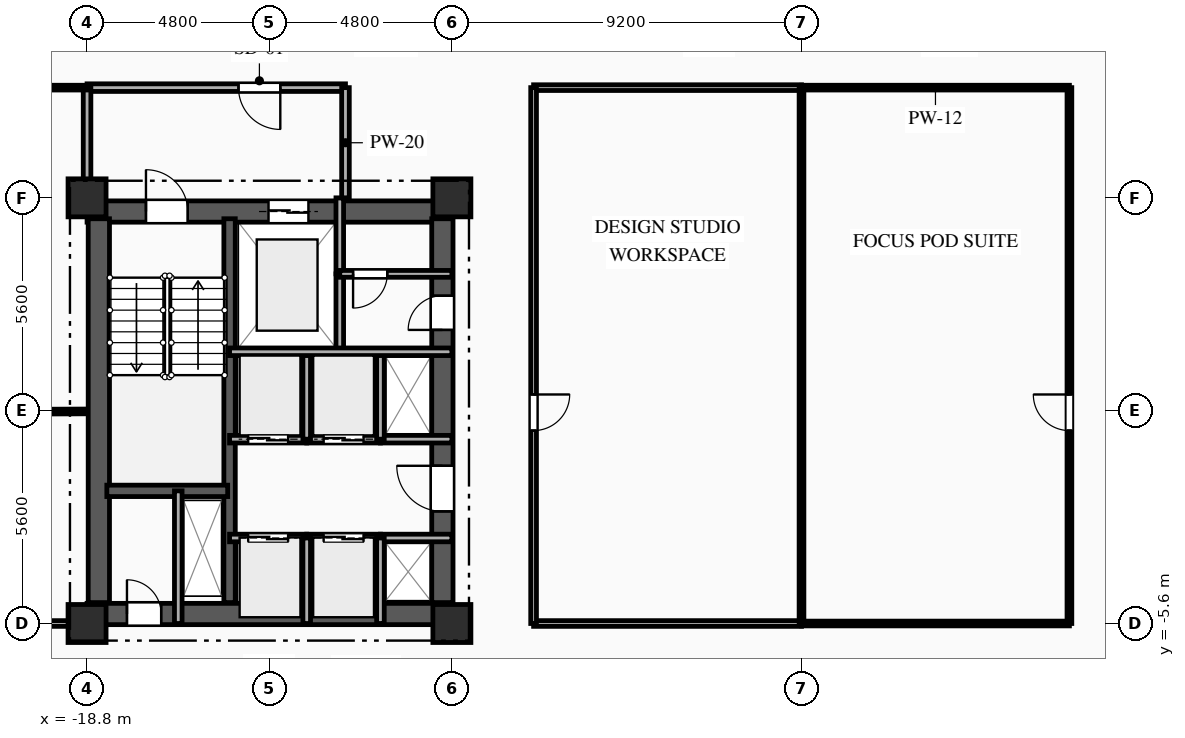
"""IFC4 building model, lengths in metres.
Left out: names, types, materials, properties, quantities, classifications, styles, units other than length and angle.
Written with IfcOpenShell. Run it as: python <this file> out.ifc"""

import sys

from ifc_helpers import new_model, si_unit, direction, frame, frame_2d, origin, origin_2d, place, context, subcontext, project, spatial, rectangle, extrude, element, fill, save


model = new_model("IFC4")
c1 = context("Model", 3, precision=1e-05, world=origin(), true_north=direction((0.0, 1.0)))
c2 = subcontext(c1, "Body", "Model", "MODEL_VIEW")
j1 = project(units=[si_unit("LENGTHUNIT", "METRE"), si_unit("PLANEANGLEUNIT", "RADIAN")], contexts=[c1])
p1 = place(None, origin())
s1 = spatial("IfcSite", under=j1, at=p1, CompositionType="ELEMENT")
p2 = place(p1, origin())
s2 = spatial("IfcBuilding", under=s1, at=p2, CompositionType="ELEMENT")
p3 = place(p2, frame((0.0, 0.0, 105.8)))
s3 = spatial("IfcBuildingStorey", under=s2, at=p3, CompositionType="ELEMENT", Elevation=105.8)
for number, where, z_axis, x_axis in (
    (1, (-18.8, -5.6, 0.0), (0.0, 0.0, 1.0), (1.0, 0.0, 0.0)),
    (2, (-18.8, 5.6, 0.0), (0.0, 0.0, 1.0), (1.0, 0.0, 0.0)),
    (3, (-9.2, -5.6, 0.0), (0.0, 0.0, 1.0), (1.0, 0.0, 0.0)),
    (4, (-9.2, 5.6, 0.0), (0.0, 0.0, 1.0), (1.0, 0.0, 0.0)),
):
    element("IfcColumn", number, at=place(p3, frame(where, z_axis=z_axis, x_axis=x_axis)), inside=s3, PredefinedType="COLUMN", context=c2, shape_type="SweptSolid", body=[
        extrude(rectangle(XDim=1.0, YDim=1.0, at=origin_2d()), origin(), (0.0, 0.0, 1.0), 3.35),
    ])
p4 = place(p3, frame((-18.8, 5.24, 0.0), z_axis=(0.0, 0.0, 1.0), x_axis=(1.0, 0.0, 0.0)))
e5 = element("IfcWall", 5, at=p4, inside=s3, PredefinedType="SHEAR", context=c2, shape_type="SweptSolid", body=[
    extrude(rectangle(XDim=9.6, YDim=0.56, at=frame_2d((4.8, 0.0))), origin(), (0.0, 0.0, 1.0), 3.045),
])
p5 = place(p4, frame((1.55, 0.0, 0.0)))
e6 = element("IfcOpeningElement", 6, at=p5, cuts=e5, PredefinedType="OPENING", context=c2, shape_type="SweptSolid", body=[
    extrude(rectangle(XDim=1.1, YDim=2.15, at=frame_2d((0.55, 1.075))), frame((0.0, 0.29, 0.0), z_axis=(0.0, -1.0, 0.0), x_axis=(1.0, 0.0, 0.0)), (0.0, 0.0, 1.0), 0.58),
])
p6 = place(p4, frame((4.775, 0.0, 0.0)))
e7 = element("IfcOpeningElement", 7, at=p6, cuts=e5, PredefinedType="OPENING", context=c2, shape_type="SweptSolid", body=[
    extrude(rectangle(XDim=1.05, YDim=2.1, at=frame_2d((0.525, 1.05))), frame((0.0, 0.29, 0.0), z_axis=(0.0, -1.0, 0.0), x_axis=(1.0, 0.0, 0.0)), (0.0, 0.0, 1.0), 0.58),
])
p7 = place(p3, frame((-18.8, -5.35, 0.0), z_axis=(0.0, 0.0, 1.0), x_axis=(1.0, 0.0, 0.0)))
e8 = element("IfcWall", 8, at=p7, inside=s3, PredefinedType="SHEAR", context=c2, shape_type="SweptSolid", body=[
    extrude(rectangle(XDim=9.6, YDim=0.56, at=frame_2d((4.8, 0.0))), origin(), (0.0, 0.0, 1.0), 3.045),
])
p8 = place(p7, frame((1.05, 0.0, 0.0)))
e9 = element("IfcOpeningElement", 9, at=p8, cuts=e8, PredefinedType="OPENING", context=c2, shape_type="SweptSolid", body=[
    extrude(rectangle(XDim=0.9, YDim=2.1, at=frame_2d((0.45, 1.05))), frame((0.0, 0.29, 0.0), z_axis=(0.0, -1.0, 0.0), x_axis=(1.0, 0.0, 0.0)), (0.0, 0.0, 1.0), 0.58),
])
p9 = place(p3, frame((-18.49, -5.05, 0.0), z_axis=(0.0, 0.0, 1.0), x_axis=(0.0, 1.0, 0.0)))
e10 = element("IfcWall", 10, at=p9, inside=s3, PredefinedType="SHEAR", context=c2, shape_type="SweptSolid", body=[
    extrude(rectangle(XDim=10.1, YDim=0.56, at=frame_2d((5.05, 0.0))), origin(), (0.0, 0.0, 1.0), 3.045),
])
p10 = place(p3, frame((-9.45, -5.05, 0.0), z_axis=(0.0, 0.0, 1.0), x_axis=(0.0, 1.0, 0.0)))
e11 = element("IfcWall", 11, at=p10, inside=s3, PredefinedType="SHEAR", context=c2, shape_type="SweptSolid", body=[
    extrude(rectangle(XDim=10.1, YDim=0.56, at=frame_2d((5.05, 0.0))), origin(), (0.0, 0.0, 1.0), 3.045),
])
p11 = place(p10, frame((7.175, 0.0, 0.0)))
e12 = element("IfcOpeningElement", 12, at=p11, cuts=e11, PredefinedType="OPENING", context=c2, shape_type="SweptSolid", body=[
    extrude(rectangle(XDim=0.9, YDim=2.1, at=frame_2d((0.45, 1.05))), frame((0.0, 0.29, 0.0), z_axis=(0.0, -1.0, 0.0), x_axis=(1.0, 0.0, 0.0)), (0.0, 0.0, 1.0), 0.58),
])
p12 = place(p10, frame((2.4, 0.0, 0.0)))
e13 = element("IfcOpeningElement", 13, at=p12, cuts=e11, PredefinedType="OPENING", context=c2, shape_type="SweptSolid", body=[
    extrude(rectangle(XDim=1.2, YDim=2.15, at=frame_2d((0.6, 1.075))), frame((0.0, 0.29, 0.0), z_axis=(0.0, -1.0, 0.0), x_axis=(1.0, 0.0, 0.0)), (0.0, 0.0, 1.0), 0.58),
])
p13 = place(p3, frame((-15.05, -5.05, 0.0), z_axis=(0.0, 0.0, 1.0), x_axis=(0.0, 1.0, 0.0)))
e14 = element("IfcWall", 14, at=p13, inside=s3, PredefinedType="SHEAR", context=c2, shape_type="SweptSolid", body=[
    extrude(rectangle(XDim=10.1, YDim=0.3, at=frame_2d((5.05, 0.0))), origin(), (0.0, 0.0, 1.0), 3.045),
])
p14 = place(p3, frame((-18.28, -2.11, 0.0), z_axis=(0.0, 0.0, 1.0), x_axis=(1.0, 0.0, 0.0)))
e15 = element("IfcWall", 15, at=p14, inside=s3, PredefinedType="SHEAR", context=c2, shape_type="SweptSolid", body=[
    extrude(rectangle(XDim=3.18, YDim=0.3, at=frame_2d((1.59, 0.0))), origin(), (0.0, 0.0, 1.0), 3.045),
])
p15 = place(p3, frame((-16.4, -5.6, 0.0), z_axis=(0.0, 0.0, 1.0), x_axis=(0.0, 1.0, 0.0)))
e16 = element("IfcWall", 16, at=p15, inside=s3, PredefinedType="PARTITIONING", context=c2, shape_type="SweptSolid", body=[
    extrude(rectangle(XDim=3.49, YDim=0.2, at=frame_2d((1.745, 0.0))), origin(), (0.0, 0.0, 1.0), 3.045),
])
p16 = place(p3, frame((-12.15, 1.55, 0.0), z_axis=(0.0, 0.0, 1.0), x_axis=(0.0, 1.0, 0.0)))
e17 = element("IfcWall", 17, at=p16, inside=s3, PredefinedType="PARTITIONING", context=c2, shape_type="SweptSolid", body=[
    extrude(rectangle(XDim=2.05, YDim=0.2, at=frame_2d((1.025, 0.0))), origin(), (0.0, 0.0, 1.0), 3.045),
])
p17 = place(p3, frame((-12.15, 3.6, 0.0), z_axis=(0.0, 0.0, 1.0), x_axis=(0.0, 1.0, 0.0)))
e18 = element("IfcWall", 18, at=p17, inside=s3, PredefinedType="PARTITIONING", context=c2, shape_type="SweptSolid", body=[
    extrude(rectangle(XDim=2.0, YDim=0.2, at=frame_2d((1.0, 0.0))), origin(), (0.0, 0.0, 1.0), 3.045),
])
p18 = place(p3, frame((-12.0, 8.5, 0.0), z_axis=(0.0, 0.0, 1.0), x_axis=(-1.0, 0.0, 0.0)))
e19 = element("IfcWall", 19, at=p18, inside=s3, PredefinedType="PARTITIONING", context=c2, shape_type="SweptSolid", body=[
    extrude(rectangle(XDim=6.8, YDim=0.2, at=frame_2d((3.4, 0.0))), origin(), (0.0, 0.0, 1.0), 3.045),
])
p19 = place(p18, frame((1.715, 0.0, 0.0)))
e20 = element("IfcOpeningElement", 20, at=p19, cuts=e19, PredefinedType="OPENING", context=c2, shape_type="SweptSolid", body=[
    extrude(rectangle(XDim=1.1, YDim=2.15, at=frame_2d((0.55, 1.075))), frame((0.0, 0.11, 0.0), z_axis=(0.0, -1.0, 0.0), x_axis=(1.0, 0.0, 0.0)), (0.0, 0.0, 1.0), 0.22),
])
p20 = place(p3, frame((-12.0, 5.6, 0.0), z_axis=(0.0, 0.0, 1.0), x_axis=(0.0, 1.0, 0.0)))
e21 = element("IfcWall", 21, at=p20, inside=s3, PredefinedType="PARTITIONING", context=c2, shape_type="SweptSolid", body=[
    extrude(rectangle(XDim=2.9, YDim=0.2, at=frame_2d((1.45, 0.0))), origin(), (0.0, 0.0, 1.0), 3.045),
])
p21 = place(p3, frame((-18.8, 8.5, 0.0), z_axis=(0.0, 0.0, 1.0), x_axis=(0.0, -1.0, 0.0)))
e22 = element("IfcWall", 22, at=p21, inside=s3, PredefinedType="PARTITIONING", context=c2, shape_type="SweptSolid", body=[
    extrude(rectangle(XDim=2.9, YDim=0.2, at=frame_2d((1.45, 0.0))), origin(), (0.0, 0.0, 1.0), 2.53),
])
p22 = place(p3, frame((-9.2, 3.6, 0.0), z_axis=(0.0, 0.0, 1.0), x_axis=(-1.0, 0.0, 0.0)))
e23 = element("IfcWall", 23, at=p22, inside=s3, PredefinedType="PARTITIONING", context=c2, shape_type="SweptSolid", body=[
    extrude(rectangle(XDim=2.95, YDim=0.18, at=frame_2d((1.475, 0.0))), origin(), (0.0, 0.0, 1.0), 3.045),
])
p23 = place(p22, frame((1.7, 0.0, 0.0)))
e24 = element("IfcOpeningElement", 24, at=p23, cuts=e23, PredefinedType="OPENING", context=c2, shape_type="SweptSolid", body=[
    extrude(rectangle(XDim=0.9, YDim=2.1, at=frame_2d((0.45, 1.05))), frame((0.0, 0.1, 0.0), z_axis=(0.0, -1.0, 0.0), x_axis=(1.0, 0.0, 0.0)), (0.0, 0.0, 1.0), 0.2),
])
p24 = place(p3, frame((-15.05, -3.35, 0.0), z_axis=(0.0, 0.0, 1.0), x_axis=(1.0, 0.0, 0.0)))
e25 = element("IfcWall", 25, at=p24, inside=s3, PredefinedType="PARTITIONING", context=c2, shape_type="SweptSolid", body=[
    extrude(rectangle(XDim=2.03, YDim=0.2, at=frame_2d((1.015, 0.0))), origin(), (0.0, 0.0, 1.0), 3.045),
])
p25 = place(p24, frame((0.49, 0.0, 0.0)))
e26 = element("IfcOpeningElement", 26, at=p25, cuts=e25, PredefinedType="OPENING", context=c2, shape_type="SweptSolid", body=[
    extrude(rectangle(XDim=1.05, YDim=2.1, at=frame_2d((0.525, 1.05))), frame((0.0, 0.11, 0.0), z_axis=(0.0, -1.0, 0.0), x_axis=(1.0, 0.0, 0.0)), (0.0, 0.0, 1.0), 0.22),
])
p26 = place(p3, frame((-13.02, -3.35, 0.0), z_axis=(0.0, 0.0, 1.0), x_axis=(1.0, 0.0, 0.0)))
e27 = element("IfcWall", 27, at=p26, inside=s3, PredefinedType="PARTITIONING", context=c2, shape_type="SweptSolid", body=[
    extrude(rectangle(XDim=1.94, YDim=0.2, at=frame_2d((0.97, 0.0))), origin(), (0.0, 0.0, 1.0), 3.045),
])
p27 = place(p26, frame((0.445, 0.0, 0.0)))
e28 = element("IfcOpeningElement", 28, at=p27, cuts=e27, PredefinedType="OPENING", context=c2, shape_type="SweptSolid", body=[
    extrude(rectangle(XDim=1.05, YDim=2.1, at=frame_2d((0.525, 1.05))), frame((0.0, 0.11, 0.0), z_axis=(0.0, -1.0, 0.0), x_axis=(1.0, 0.0, 0.0)), (0.0, 0.0, 1.0), 0.22),
])
p28 = place(p3, frame((-11.08, -3.35, 0.0), z_axis=(0.0, 0.0, 1.0), x_axis=(1.0, 0.0, 0.0)))
e29 = element("IfcWall", 29, at=p28, inside=s3, PredefinedType="PARTITIONING", context=c2, shape_type="SweptSolid", body=[
    extrude(rectangle(XDim=1.88, YDim=0.2, at=frame_2d((0.94, 0.0))), origin(), (0.0, 0.0, 1.0), 2.76),
])
p29 = place(p3, frame((-13.02, -0.75, 0.0), z_axis=(0.0, 0.0, 1.0), x_axis=(-1.0, 0.0, 0.0)))
e30 = element("IfcWall", 30, at=p29, inside=s3, PredefinedType="PARTITIONING", context=c2, shape_type="SweptSolid", body=[
    extrude(rectangle(XDim=2.03, YDim=0.2, at=frame_2d((1.015, 0.0))), origin(), (0.0, 0.0, 1.0), 3.045),
])
p30 = place(p29, frame((0.49, 0.0, 0.0)))
e31 = element("IfcOpeningElement", 31, at=p30, cuts=e30, PredefinedType="OPENING", context=c2, shape_type="SweptSolid", body=[
    extrude(rectangle(XDim=1.05, YDim=2.1, at=frame_2d((0.525, 1.05))), frame((0.0, 0.11, 0.0), z_axis=(0.0, -1.0, 0.0), x_axis=(1.0, 0.0, 0.0)), (0.0, 0.0, 1.0), 0.22),
])
p31 = place(p3, frame((-11.08, -0.75, 0.0), z_axis=(0.0, 0.0, 1.0), x_axis=(-1.0, 0.0, 0.0)))
e32 = element("IfcWall", 32, at=p31, inside=s3, PredefinedType="PARTITIONING", context=c2, shape_type="SweptSolid", body=[
    extrude(rectangle(XDim=1.94, YDim=0.2, at=frame_2d((0.97, 0.0))), origin(), (0.0, 0.0, 1.0), 3.045),
])
p32 = place(p31, frame((0.445, 0.0, 0.0)))
e33 = element("IfcOpeningElement", 33, at=p32, cuts=e32, PredefinedType="OPENING", context=c2, shape_type="SweptSolid", body=[
    extrude(rectangle(XDim=1.05, YDim=2.1, at=frame_2d((0.525, 1.05))), frame((0.0, 0.11, 0.0), z_axis=(0.0, -1.0, 0.0), x_axis=(1.0, 0.0, 0.0)), (0.0, 0.0, 1.0), 0.22),
])
p33 = place(p3, frame((-9.2, -0.75, 0.0), z_axis=(0.0, 0.0, 1.0), x_axis=(-1.0, 0.0, 0.0)))
e34 = element("IfcWall", 34, at=p33, inside=s3, PredefinedType="PARTITIONING", context=c2, shape_type="SweptSolid", body=[
    extrude(rectangle(XDim=1.88, YDim=0.2, at=frame_2d((0.94, 0.0))), origin(), (0.0, 0.0, 1.0), 3.045),
])
for number, where, z_axis, x_axis in (
    (35, (-13.02, -5.6, 0.0), (0.0, 0.0, 1.0), (0.0, 1.0, 0.0)),
    (36, (-11.08, -5.6, 0.0), (0.0, 0.0, 1.0), (0.0, 1.0, 0.0)),
):
    element("IfcWall", number, at=place(p3, frame(where, z_axis=z_axis, x_axis=x_axis)), inside=s3, PredefinedType="PARTITIONING", context=c2, shape_type="SweptSolid", body=[
        extrude(rectangle(XDim=2.25, YDim=0.2, at=frame_2d((1.125, 0.0))), origin(), (0.0, 0.0, 1.0), 3.045),
    ])
for number, where, z_axis, x_axis in (
    (37, (-13.02, -0.75, 0.0), (0.0, 0.0, 1.0), (0.0, 1.0, 0.0)),
    (38, (-11.08, -0.75, 0.0), (0.0, 0.0, 1.0), (0.0, 1.0, 0.0)),
):
    element("IfcWall", number, at=place(p3, frame(where, z_axis=z_axis, x_axis=x_axis)), inside=s3, PredefinedType="PARTITIONING", context=c2, shape_type="SweptSolid", body=[
        extrude(rectangle(XDim=2.3, YDim=0.2, at=frame_2d((1.15, 0.0))), origin(), (0.0, 0.0, 1.0), 3.045),
    ])
p34 = place(p3, frame((-18.8, 8.5, 0.0), z_axis=(0.0, 0.0, 1.0), x_axis=(-1.0, 0.0, 0.0)))
e39 = element("IfcWall", 39, at=p34, inside=s3, PredefinedType="PARTITIONING", context=c2, shape_type="SweptSolid", body=[
    extrude(rectangle(XDim=4.2, YDim=0.125, at=frame_2d((2.1, 0.0))), origin(), (0.0, 0.0, 1.0), 3.045),
])
p35 = place(p34, frame((2.409, 0.0, 0.0)))
e40 = element("IfcOpeningElement", 40, at=p35, cuts=e39, PredefinedType="OPENING", context=c2, shape_type="SweptSolid", body=[
    extrude(rectangle(XDim=0.95, YDim=2.1, at=frame_2d((0.475, 1.05))), frame((0.0, 0.073, 0.0), z_axis=(0.0, -1.0, 0.0), x_axis=(1.0, 0.0, 0.0)), (0.0, 0.0, 1.0), 0.145),
])
p36 = place(p3, frame((0.0, 8.5, 0.0), z_axis=(0.0, 0.0, 1.0), x_axis=(-1.0, 0.0, 0.0)))
e41 = element("IfcWall", 41, at=p36, inside=s3, PredefinedType="PARTITIONING", context=c2, shape_type="SweptSolid", body=[
    extrude(rectangle(XDim=7.05, YDim=0.15, at=frame_2d((3.525, 0.0))), origin(), (0.0, 0.0, 1.0), 3.045),
])
p37 = place(p3, frame((7.05, 8.5, 0.0), z_axis=(0.0, 0.0, 1.0), x_axis=(-1.0, 0.0, 0.0)))
e42 = element("IfcWall", 42, at=p37, inside=s3, PredefinedType="PARTITIONING", context=c2, shape_type="SweptSolid", body=[
    extrude(rectangle(XDim=7.05, YDim=0.125, at=frame_2d((3.525, 0.0))), origin(), (0.0, 0.0, 1.0), 3.045),
])
p38 = place(p3, frame((-23.0, -5.6, 0.0), z_axis=(0.0, 0.0, 1.0), x_axis=(1.0, 0.0, 0.0)))
e43 = element("IfcWall", 43, at=p38, inside=s3, PredefinedType="PARTITIONING", context=c2, shape_type="SweptSolid", body=[
    extrude(rectangle(XDim=4.2, YDim=0.15, at=frame_2d((2.1, 0.0))), origin(), (0.0, 0.0, 1.0), 3.045),
])
p39 = place(p38, frame((0.829, 0.0, 0.0)))
e44 = element("IfcOpeningElement", 44, at=p39, cuts=e43, PredefinedType="OPENING", context=c2, shape_type="SweptSolid", body=[
    extrude(rectangle(XDim=1.05, YDim=2.15, at=frame_2d((0.525, 1.075))), frame((0.0, 0.085, 0.0), z_axis=(0.0, -1.0, 0.0), x_axis=(1.0, 0.0, 0.0)), (0.0, 0.0, 1.0), 0.17),
])
p40 = place(p3, frame((-7.05, -5.6, 0.0), z_axis=(0.0, 0.0, 1.0), x_axis=(1.0, 0.0, 0.0)))
e45 = element("IfcWall", 45, at=p40, inside=s3, PredefinedType="PARTITIONING", context=c2, shape_type="SweptSolid", body=[
    extrude(rectangle(XDim=7.05, YDim=0.15, at=frame_2d((3.525, 0.0))), origin(), (0.0, 0.0, 1.0), 2.53),
])
p41 = place(p3, frame((0.0, -5.6, 0.0), z_axis=(0.0, 0.0, 1.0), x_axis=(1.0, 0.0, 0.0)))
e46 = element("IfcWall", 46, at=p41, inside=s3, PredefinedType="PARTITIONING", context=c2, shape_type="SweptSolid", body=[
    extrude(rectangle(XDim=7.05, YDim=0.125, at=frame_2d((3.525, 0.0))), origin(), (0.0, 0.0, 1.0), 2.53),
])
p42 = place(p3, frame((-7.05, 8.5, 0.0), z_axis=(0.0, 0.0, 1.0), x_axis=(0.0, -1.0, 0.0)))
e47 = element("IfcWall", 47, at=p42, inside=s3, PredefinedType="PARTITIONING", context=c2, shape_type="SweptSolid", body=[
    extrude(rectangle(XDim=14.1, YDim=0.15, at=frame_2d((7.05, 0.0))), origin(), (0.0, 0.0, 1.0), 3.045),
])
p43 = place(p42, frame((8.074, 0.0, 0.0)))
e48 = element("IfcOpeningElement", 48, at=p43, cuts=e47, PredefinedType="OPENING", context=c2, shape_type="SweptSolid", body=[
    extrude(rectangle(XDim=0.95, YDim=2.1, at=frame_2d((0.475, 1.05))), frame((0.0, 0.085, 0.0), z_axis=(0.0, -1.0, 0.0), x_axis=(1.0, 0.0, 0.0)), (0.0, 0.0, 1.0), 0.17),
])
p44 = place(p3, frame((7.05, -5.6, 0.0), z_axis=(0.0, 0.0, 1.0), x_axis=(0.0, 1.0, 0.0)))
e49 = element("IfcWall", 49, at=p44, inside=s3, PredefinedType="PARTITIONING", context=c2, shape_type="SweptSolid", body=[
    extrude(rectangle(XDim=14.1, YDim=0.125, at=frame_2d((7.05, 0.0))), origin(), (0.0, 0.0, 1.0), 3.045),
])
p45 = place(p44, frame((5.076, 0.0, 0.0)))
e50 = element("IfcOpeningElement", 50, at=p45, cuts=e49, PredefinedType="OPENING", context=c2, shape_type="SweptSolid", body=[
    extrude(rectangle(XDim=0.95, YDim=2.1, at=frame_2d((0.475, 1.05))), frame((0.0, 0.073, 0.0), z_axis=(0.0, -1.0, 0.0), x_axis=(1.0, 0.0, 0.0)), (0.0, 0.0, 1.0), 0.145),
])
p46 = place(p3, frame((-28.671, -0.064, 0.0), z_axis=(0.0, 0.0, 1.0), x_axis=(0.999990089865, 0.004451985263, 0.0)))
e51 = element("IfcWall", 51, at=p46, inside=s3, PredefinedType="PARTITIONING", context=c2, shape_type="SweptSolid", body=[
    extrude(rectangle(XDim=9.871, YDim=0.125, at=frame_2d((4.936, 0.0))), origin(), (0.0, 0.0, 1.0), 3.045),
])
p47 = place(p3, frame((0.0, 8.5, 0.0), z_axis=(0.0, 0.0, 1.0), x_axis=(0.0, -1.0, 0.0)))
e52 = element("IfcWall", 52, at=p47, inside=s3, PredefinedType="PARTITIONING", context=c2, shape_type="SweptSolid", body=[
    extrude(rectangle(XDim=14.1, YDim=0.125, at=frame_2d((7.05, 0.0))), origin(), (0.0, 0.0, 1.0), 3.045),
])
p48 = place(p3, frame((-15.05, 1.55, 0.0), z_axis=(0.0, 0.0, 1.0), x_axis=(1.0, 0.0, 0.0)))
e53 = element("IfcWall", 53, at=p48, inside=s3, PredefinedType="PARTITIONING", context=c2, shape_type="SweptSolid", body=[
    extrude(rectangle(XDim=5.85, YDim=0.2, at=frame_2d((2.925, 0.0))), origin(), (0.0, 0.0, 1.0), 3.045),
])
p49 = place(p5, origin())
e54 = element("IfcDoor", 54, at=p49, inside=s3, OperationType="SINGLE_SWING_LEFT", PredefinedType="DOOR", context=c2, shape_type="SweptSolid", body=[
    extrude(rectangle(XDim=1.1, YDim=2.15, at=frame_2d((0.55, 1.075))), frame((0.0, 0.025, 0.0), z_axis=(0.0, -1.0, 0.0), x_axis=(1.0, 0.0, 0.0)), (0.0, 0.0, 1.0), 0.05),
])
fill(e6, e54)
p50 = place(p6, origin())
e55 = element("IfcDoor", 55, at=p50, inside=s3, OperationType="DOUBLE_DOOR_SLIDING", PredefinedType="DOOR", context=c2, shape_type="SweptSolid", body=[
    extrude(rectangle(XDim=1.05, YDim=2.1, at=frame_2d((0.525, 1.05))), frame((0.0, 0.025, 0.0), z_axis=(0.0, -1.0, 0.0), x_axis=(1.0, 0.0, 0.0)), (0.0, 0.0, 1.0), 0.05),
])
fill(e7, e55)
p51 = place(p8, origin())
e56 = element("IfcDoor", 56, at=p51, inside=s3, OperationType="SINGLE_SWING_LEFT", PredefinedType="DOOR", context=c2, shape_type="SweptSolid", body=[
    extrude(rectangle(XDim=0.9, YDim=2.1, at=frame_2d((0.45, 1.05))), frame((0.0, 0.025, 0.0), z_axis=(0.0, -1.0, 0.0), x_axis=(1.0, 0.0, 0.0)), (0.0, 0.0, 1.0), 0.05),
])
fill(e9, e56)
p52 = place(p19, origin())
e57 = element("IfcDoor", 57, at=p52, inside=s3, OperationType="SINGLE_SWING_LEFT", PredefinedType="DOOR", context=c2, shape_type="SweptSolid", body=[
    extrude(rectangle(XDim=1.1, YDim=2.15, at=frame_2d((0.55, 1.075))), frame((0.0, 0.025, 0.0), z_axis=(0.0, -1.0, 0.0), x_axis=(1.0, 0.0, 0.0)), (0.0, 0.0, 1.0), 0.05),
])
fill(e20, e57)
p53 = place(p23, origin())
e58 = element("IfcDoor", 58, at=p53, inside=s3, OperationType="SINGLE_SWING_RIGHT", PredefinedType="DOOR", context=c2, shape_type="SweptSolid", body=[
    extrude(rectangle(XDim=0.9, YDim=2.1, at=frame_2d((0.45, 1.05))), frame((0.0, 0.025, 0.0), z_axis=(0.0, -1.0, 0.0), x_axis=(1.0, 0.0, 0.0)), (0.0, 0.0, 1.0), 0.05),
])
fill(e24, e58)
p54 = place(p11, origin())
e59 = element("IfcDoor", 59, at=p54, inside=s3, OperationType="SINGLE_SWING_LEFT", PredefinedType="DOOR", context=c2, shape_type="SweptSolid", body=[
    extrude(rectangle(XDim=0.9, YDim=2.1, at=frame_2d((0.45, 1.05))), frame((0.0, 0.025, 0.0), z_axis=(0.0, -1.0, 0.0), x_axis=(1.0, 0.0, 0.0)), (0.0, 0.0, 1.0), 0.05),
])
fill(e12, e59)
p55 = place(p25, origin())
e60 = element("IfcDoor", 60, at=p55, inside=s3, OperationType="DOUBLE_DOOR_SLIDING", PredefinedType="DOOR", context=c2, shape_type="SweptSolid", body=[
    extrude(rectangle(XDim=1.05, YDim=2.1, at=frame_2d((0.525, 1.05))), frame((0.0, 0.025, 0.0), z_axis=(0.0, -1.0, 0.0), x_axis=(1.0, 0.0, 0.0)), (0.0, 0.0, 1.0), 0.05),
])
fill(e26, e60)
p56 = place(p27, origin())
e61 = element("IfcDoor", 61, at=p56, inside=s3, OperationType="DOUBLE_DOOR_SLIDING", PredefinedType="DOOR", context=c2, shape_type="SweptSolid", body=[
    extrude(rectangle(XDim=1.05, YDim=2.1, at=frame_2d((0.525, 1.05))), frame((0.0, 0.025, 0.0), z_axis=(0.0, -1.0, 0.0), x_axis=(1.0, 0.0, 0.0)), (0.0, 0.0, 1.0), 0.05),
])
fill(e28, e61)
p57 = place(p30, origin())
e62 = element("IfcDoor", 62, at=p57, inside=s3, OperationType="DOUBLE_DOOR_SLIDING", PredefinedType="DOOR", context=c2, shape_type="SweptSolid", body=[
    extrude(rectangle(XDim=1.05, YDim=2.1, at=frame_2d((0.525, 1.05))), frame((0.0, 0.025, 0.0), z_axis=(0.0, -1.0, 0.0), x_axis=(1.0, 0.0, 0.0)), (0.0, 0.0, 1.0), 0.05),
])
fill(e31, e62)
p58 = place(p32, origin())
e63 = element("IfcDoor", 63, at=p58, inside=s3, OperationType="DOUBLE_DOOR_SLIDING", PredefinedType="DOOR", context=c2, shape_type="SweptSolid", body=[
    extrude(rectangle(XDim=1.05, YDim=2.1, at=frame_2d((0.525, 1.05))), frame((0.0, 0.025, 0.0), z_axis=(0.0, -1.0, 0.0), x_axis=(1.0, 0.0, 0.0)), (0.0, 0.0, 1.0), 0.05),
])
fill(e33, e63)
p59 = place(p12, origin())
e64 = element("IfcDoor", 64, at=p59, inside=s3, OperationType="SINGLE_SWING_RIGHT", PredefinedType="DOOR", context=c2, shape_type="SweptSolid", body=[
    extrude(rectangle(XDim=1.2, YDim=2.15, at=frame_2d((0.6, 1.075))), frame((0.0, 0.025, 0.0), z_axis=(0.0, -1.0, 0.0), x_axis=(1.0, 0.0, 0.0)), (0.0, 0.0, 1.0), 0.05),
])
fill(e13, e64)
p60 = place(p43, origin())
e65 = element("IfcDoor", 65, at=p60, inside=s3, OperationType="SINGLE_SWING_LEFT", PredefinedType="DOOR", context=c2, shape_type="SweptSolid", body=[
    extrude(rectangle(XDim=0.95, YDim=2.1, at=frame_2d((0.475, 1.05))), frame((0.0, 0.025, 0.0), z_axis=(0.0, -1.0, 0.0), x_axis=(1.0, 0.0, 0.0)), (0.0, 0.0, 1.0), 0.05),
])
fill(e48, e65)
p61 = place(p45, origin())
e66 = element("IfcDoor", 66, at=p61, inside=s3, OperationType="SINGLE_SWING_RIGHT", PredefinedType="DOOR", context=c2, shape_type="SweptSolid", body=[
    extrude(rectangle(XDim=0.95, YDim=2.1, at=frame_2d((0.475, 1.05))), frame((0.0, 0.025, 0.0), z_axis=(0.0, -1.0, 0.0), x_axis=(1.0, 0.0, 0.0)), (0.0, 0.0, 1.0), 0.05),
])
fill(e50, e66)
save(model, sys.argv[1])
